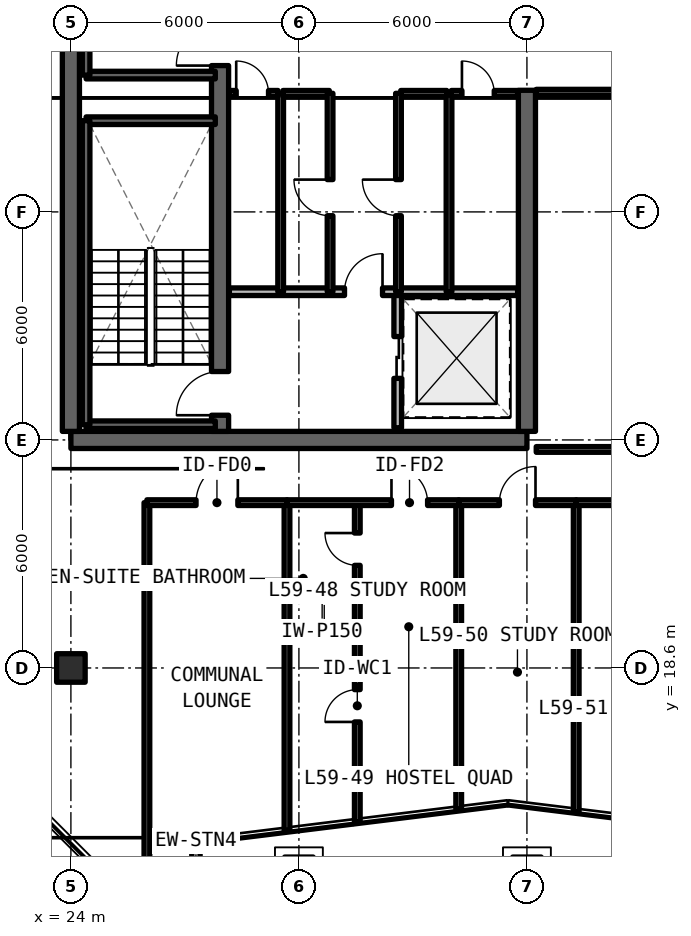
"""IFC4 building model, lengths in metres.
Left out: names, types, materials, properties, quantities, classifications, styles, units other than length and angle.
Written with IfcOpenShell. Run it as: python <this file> out.ifc"""

import sys

from ifc_helpers import new_model, si_unit, direction, frame, frame_2d, origin, origin_2d, place, context, subcontext, project, spatial, rectangle, extrude, element, fill, save


model = new_model("IFC4")
c1 = context("Model", 3, precision=1e-05, world=origin(), true_north=direction((0.0, 1.0)))
c2 = subcontext(c1, "Body", "Model", "MODEL_VIEW")
j1 = project(units=[si_unit("LENGTHUNIT", "METRE"), si_unit("PLANEANGLEUNIT", "RADIAN")], contexts=[c1])
p1 = place(None, origin())
s1 = spatial("IfcSite", under=j1, at=p1, CompositionType="ELEMENT")
p2 = place(p1, origin())
s2 = spatial("IfcBuilding", under=s1, at=p2, CompositionType="ELEMENT")
p3 = place(p2, frame((0.0, 0.0, 211.86)))
s3 = spatial("IfcBuildingStorey", under=s2, at=p3, CompositionType="ELEMENT", Elevation=211.86)
p4 = place(p3, frame((24.0, 24.6, 0.0), z_axis=(0.0, 0.0, 1.0), x_axis=(1.0, 0.0, 0.0)))
e1 = element("IfcWall", 1, at=p4, inside=s3, PredefinedType="SHEAR", context=c2, shape_type="SweptSolid", body=[
    extrude(rectangle(XDim=12.0, YDim=0.45, at=frame_2d((6.0, 0.0))), origin(), (0.0, 0.0, 1.0), 3.63),
])
p5 = place(p3, frame((24.0, 24.825, 0.0), z_axis=(0.0, 0.0, 1.0), x_axis=(0.0, 1.0, 0.0)))
e2 = element("IfcWall", 2, at=p5, inside=s3, PredefinedType="SHEAR", context=c2, shape_type="SweptSolid", body=[
    extrude(rectangle(XDim=17.55, YDim=0.45, at=frame_2d((8.775, 0.0))), origin(), (0.0, 0.0, 1.0), 3.63),
])
p6 = place(p3, frame((36.0, 24.825, 0.0), z_axis=(0.0, 0.0, 1.0), x_axis=(0.0, 1.0, 0.0)))
e3 = element("IfcWall", 3, at=p6, inside=s3, PredefinedType="SHEAR", context=c2, shape_type="SweptSolid", body=[
    extrude(rectangle(XDim=8.975, YDim=0.45, at=frame_2d((4.488, 0.0))), origin(), (0.0, 0.0, 1.0), 3.63),
])
p7 = place(p3, frame((27.925, 24.825, 0.0), z_axis=(0.0, 0.0, 1.0), x_axis=(0.0, 1.0, 0.0)))
e4 = element("IfcWall", 4, at=p7, inside=s3, PredefinedType="SHEAR", context=c2, shape_type="SweptSolid", body=[
    extrude(rectangle(XDim=17.55, YDim=0.45, at=frame_2d((8.775, 0.0))), origin(), (0.0, 0.0, 1.0), 3.63),
])
p8 = place(p7, frame((0.425, 0.0, 0.0)))
e5 = element("IfcOpeningElement", 5, at=p8, cuts=e4, PredefinedType="OPENING", context=c2, shape_type="SweptSolid", body=[
    extrude(rectangle(XDim=1.15, YDim=2.15, at=frame_2d((0.575, 1.075))), frame((0.0, 0.235, 0.0), z_axis=(0.0, -1.0, 0.0), x_axis=(1.0, 0.0, 0.0)), (0.0, 0.0, 1.0), 0.47),
])
p9 = place(p7, frame((9.625, 0.0, 0.0)))
e6 = element("IfcOpeningElement", 6, at=p9, cuts=e4, PredefinedType="OPENING", context=c2, shape_type="SweptSolid", body=[
    extrude(rectangle(XDim=1.15, YDim=2.15, at=frame_2d((0.575, 1.075))), frame((0.0, 0.235, 0.0), z_axis=(0.0, -1.0, 0.0), x_axis=(1.0, 0.0, 0.0)), (0.0, 0.0, 1.0), 0.47),
])
p10 = place(p3, frame((24.0, 18.6, 0.0), z_axis=(0.0, 0.0, 1.0), x_axis=(1.0, 0.0, 0.0)))
e7 = element("IfcColumn", 7, at=p10, inside=s3, PredefinedType="COLUMN", context=c2, shape_type="SweptSolid", body=[
    extrude(rectangle(XDim=0.75, YDim=0.75, at=origin_2d()), origin(), (0.0, 0.0, 1.0), 3.63),
])
p11 = place(p3, frame((27.29, 12.16, 0.0), z_axis=(0.0, 0.0, 1.0), x_axis=(0.0, 1.0, 0.0)))
e8 = element("IfcWall", 8, at=p11, inside=s3, PredefinedType="SOLIDWALL", context=c2, shape_type="SweptSolid", body=[
    extrude(rectangle(XDim=1.867, YDim=0.22, at=frame_2d((0.934, 0.0))), origin(), (0.0, 0.0, 1.0), 3.41),
])
p12 = place(p3, frame((21.71, 16.296, 0.0), z_axis=(0.0, 0.0, 1.0), x_axis=(0.707106781187, -0.707106781187, 0.0)))
e9 = element("IfcWall", 9, at=p12, inside=s3, PredefinedType="SOLIDWALL", context=c2, shape_type="SweptSolid", body=[
    extrude(rectangle(XDim=5.849, YDim=0.22, at=frame_2d((2.924, 0.0))), origin(), (0.0, 0.0, 1.0), 3.41),
])
p13 = place(p12, frame((1.224, 0.0, 0.78)))
e10 = element("IfcOpeningElement", 10, at=p13, cuts=e9, PredefinedType="OPENING", context=c2, shape_type="SweptSolid", body=[
    extrude(rectangle(XDim=3.4, YDim=1.66, at=frame_2d((1.7, 0.83))), frame((0.0, 0.12, 0.0), z_axis=(0.0, -1.0, 0.0), x_axis=(1.0, 0.0, 0.0)), (0.0, 0.0, 1.0), 0.24),
])
p14 = place(p3, frame((32.6, 24.92, 0.0), z_axis=(0.0, 0.0, 1.0), x_axis=(0.0, 1.0, 0.0)))
e11 = element("IfcWall", 11, at=p14, inside=s3, PredefinedType="SOLIDWALL", context=c2, shape_type="SweptSolid", body=[
    extrude(rectangle(XDim=3.58, YDim=0.2, at=frame_2d((1.79, 0.0))), origin(), (0.0, 0.0, 1.0), 2.63),
])
p15 = place(p14, frame((1.3, 0.0, 0.0)))
e12 = element("IfcOpeningElement", 12, at=p15, cuts=e11, PredefinedType="OPENING", context=c2, shape_type="SweptSolid", body=[
    extrude(rectangle(XDim=1.1, YDim=2.2, at=frame_2d((0.55, 1.1))), frame((0.0, 0.11, 0.0), z_axis=(0.0, -1.0, 0.0), x_axis=(1.0, 0.0, 0.0)), (0.0, 0.0, 1.0), 0.22),
])
p16 = place(p3, frame((28.17, 28.5, 0.0), z_axis=(0.0, 0.0, 1.0), x_axis=(1.0, 0.0, 0.0)))
e13 = element("IfcWall", 13, at=p16, inside=s3, PredefinedType="SOLIDWALL", context=c2, shape_type="SweptSolid", body=[
    extrude(rectangle(XDim=7.585, YDim=0.2, at=frame_2d((3.792, 0.0))), origin(), (0.0, 0.0, 1.0), 2.63),
])
p17 = place(p16, frame((3.03, 0.0, 0.0)))
e14 = element("IfcOpeningElement", 14, at=p17, cuts=e13, PredefinedType="OPENING", context=c2, shape_type="SweptSolid", body=[
    extrude(rectangle(XDim=1.0, YDim=2.15, at=frame_2d((0.5, 1.075))), frame((0.0, 0.11, 0.0), z_axis=(0.0, -1.0, 0.0), x_axis=(1.0, 0.0, 0.0)), (0.0, 0.0, 1.0), 0.22),
])
p18 = place(p3, frame((29.52, 28.5, 0.0), z_axis=(0.0, 0.0, 1.0), x_axis=(0.0, 1.0, 0.0)))
e15 = element("IfcWall", 15, at=p18, inside=s3, PredefinedType="SOLIDWALL", context=c2, shape_type="SweptSolid", body=[
    extrude(rectangle(XDim=5.22, YDim=0.15, at=frame_2d((2.61, 0.0))), origin(), (0.0, 0.0, 1.0), 2.63),
])
p19 = place(p3, frame((28.17, 33.72, 0.0), z_axis=(0.0, 0.0, 1.0), x_axis=(1.0, 0.0, 0.0)))
e16 = element("IfcWall", 16, at=p19, inside=s3, PredefinedType="SOLIDWALL", context=c2, shape_type="SweptSolid", body=[
    extrude(rectangle(XDim=1.28, YDim=0.15, at=frame_2d((0.64, 0.0))), origin(), (0.0, 0.0, 1.0), 2.63),
])
p20 = place(p19, frame((0.18, 0.0, 0.0)))
e17 = element("IfcOpeningElement", 17, at=p20, cuts=e16, PredefinedType="OPENING", context=c2, shape_type="SweptSolid", body=[
    extrude(rectangle(XDim=0.85, YDim=2.1, at=frame_2d((0.425, 1.05))), frame((0.0, 0.085, 0.0), z_axis=(0.0, -1.0, 0.0), x_axis=(1.0, 0.0, 0.0)), (0.0, 0.0, 1.0), 0.17),
])
p21 = place(p3, frame((29.58, 33.72, 0.0), z_axis=(0.0, 0.0, 1.0), x_axis=(1.0, 0.0, 0.0)))
e18 = element("IfcWall", 18, at=p21, inside=s3, PredefinedType="SOLIDWALL", context=c2, shape_type="SweptSolid", body=[
    extrude(rectangle(XDim=1.22, YDim=0.15, at=frame_2d((0.61, 0.0))), origin(), (0.0, 0.0, 1.0), 2.63),
])
p22 = place(p3, frame((30.82, 28.5, 0.0), z_axis=(0.0, 0.0, 1.0), x_axis=(0.0, 1.0, 0.0)))
e19 = element("IfcWall", 19, at=p22, inside=s3, PredefinedType="SOLIDWALL", context=c2, shape_type="SweptSolid", body=[
    extrude(rectangle(XDim=5.22, YDim=0.15, at=frame_2d((2.61, 0.0))), origin(), (0.0, 0.0, 1.0), 2.63),
])
p23 = place(p22, frame((2.0, 0.0, 0.0)))
e20 = element("IfcOpeningElement", 20, at=p23, cuts=e19, PredefinedType="OPENING", context=c2, shape_type="SweptSolid", body=[
    extrude(rectangle(XDim=0.95, YDim=2.15, at=frame_2d((0.475, 1.075))), frame((0.0, 0.085, 0.0), z_axis=(0.0, -1.0, 0.0), x_axis=(1.0, 0.0, 0.0)), (0.0, 0.0, 1.0), 0.17),
])
p24 = place(p3, frame((33.95, 28.5, 0.0), z_axis=(0.0, 0.0, 1.0), x_axis=(0.0, 1.0, 0.0)))
e21 = element("IfcWall", 21, at=p24, inside=s3, PredefinedType="SOLIDWALL", context=c2, shape_type="SweptSolid", body=[
    extrude(rectangle(XDim=5.22, YDim=0.15, at=frame_2d((2.61, 0.0))), origin(), (0.0, 0.0, 1.0), 2.63),
])
p25 = place(p3, frame((32.68, 33.72, 0.0), z_axis=(0.0, 0.0, 1.0), x_axis=(1.0, 0.0, 0.0)))
e22 = element("IfcWall", 22, at=p25, inside=s3, PredefinedType="SOLIDWALL", context=c2, shape_type="SweptSolid", body=[
    extrude(rectangle(XDim=1.21, YDim=0.15, at=frame_2d((0.605, 0.0))), origin(), (0.0, 0.0, 1.0), 2.63),
])
p26 = place(p3, frame((34.01, 33.72, 0.0), z_axis=(0.0, 0.0, 1.0), x_axis=(1.0, 0.0, 0.0)))
e23 = element("IfcWall", 23, at=p26, inside=s3, PredefinedType="SOLIDWALL", context=c2, shape_type="SweptSolid", body=[
    extrude(rectangle(XDim=1.745, YDim=0.15, at=frame_2d((0.873, 0.0))), origin(), (0.0, 0.0, 1.0), 2.63),
])
p27 = place(p26, frame((0.28, 0.0, 0.0)))
e24 = element("IfcOpeningElement", 24, at=p27, cuts=e23, PredefinedType="OPENING", context=c2, shape_type="SweptSolid", body=[
    extrude(rectangle(XDim=0.85, YDim=2.1, at=frame_2d((0.425, 1.05))), frame((0.0, 0.085, 0.0), z_axis=(0.0, -1.0, 0.0), x_axis=(1.0, 0.0, 0.0)), (0.0, 0.0, 1.0), 0.17),
])
p28 = place(p3, frame((32.62, 28.5, 0.0), z_axis=(0.0, 0.0, 1.0), x_axis=(0.0, 1.0, 0.0)))
e25 = element("IfcWall", 25, at=p28, inside=s3, PredefinedType="SOLIDWALL", context=c2, shape_type="SweptSolid", body=[
    extrude(rectangle(XDim=5.22, YDim=0.15, at=frame_2d((2.61, 0.0))), origin(), (0.0, 0.0, 1.0), 2.63),
])
p29 = place(p28, frame((2.0, 0.0, 0.0)))
e26 = element("IfcOpeningElement", 26, at=p29, cuts=e25, PredefinedType="OPENING", context=c2, shape_type="SweptSolid", body=[
    extrude(rectangle(XDim=0.95, YDim=2.15, at=frame_2d((0.475, 1.075))), frame((0.0, 0.085, 0.0), z_axis=(0.0, -1.0, 0.0), x_axis=(1.0, 0.0, 0.0)), (0.0, 0.0, 1.0), 0.17),
])
p30 = place(p3, frame((36.245, 24.35, 0.0), z_axis=(0.0, 0.0, 1.0), x_axis=(1.0, 0.0, 0.0)))
e27 = element("IfcWall", 27, at=p30, inside=s3, PredefinedType="SOLIDWALL", context=c2, shape_type="SweptSolid", body=[
    extrude(rectangle(XDim=7.905, YDim=0.15, at=frame_2d((3.952, 0.0))), origin(), (0.0, 0.0, 1.0), 2.63),
])
p31 = place(p3, frame((36.245, 33.75, 0.0), z_axis=(0.0, 0.0, 1.0), x_axis=(1.0, 0.0, 0.0)))
e28 = element("IfcWall", 28, at=p31, inside=s3, PredefinedType="SOLIDWALL", context=c2, shape_type="SweptSolid", body=[
    extrude(rectangle(XDim=7.905, YDim=0.15, at=frame_2d((3.952, 0.0))), origin(), (0.0, 0.0, 1.0), 2.63),
])
p32 = place(p31, frame((3.478, 0.0, 0.0)))
e29 = element("IfcOpeningElement", 29, at=p32, cuts=e28, PredefinedType="OPENING", context=c2, shape_type="SweptSolid", body=[
    extrude(rectangle(XDim=0.95, YDim=2.15, at=frame_2d((0.475, 1.075))), frame((0.0, 0.085, 0.0), z_axis=(0.0, -1.0, 0.0), x_axis=(1.0, 0.0, 0.0)), (0.0, 0.0, 1.0), 0.17),
])
p33 = place(p3, frame((26.0, 12.16, 0.0), z_axis=(0.0, 0.0, 1.0), x_axis=(0.0, 1.0, 0.0)))
e30 = element("IfcWall", 30, at=p33, inside=s3, PredefinedType="SOLIDWALL", context=c2, shape_type="SweptSolid", body=[
    extrude(rectangle(XDim=10.79, YDim=0.15, at=frame_2d((5.395, 0.0))), origin(), (0.0, 0.0, 1.0), 2.63),
])
p34 = place(p3, frame((29.686, 14.323, 0.0), z_axis=(0.0, 0.0, 1.0), x_axis=(0.0, 1.0, 0.0)))
e31 = element("IfcWall", 31, at=p34, inside=s3, PredefinedType="SOLIDWALL", context=c2, shape_type="SweptSolid", body=[
    extrude(rectangle(XDim=8.627, YDim=0.15, at=frame_2d((4.313, 0.0))), origin(), (0.0, 0.0, 1.0), 2.63),
])
p35 = place(p3, frame((26.0, 22.95, 0.0), z_axis=(0.0, 0.0, 1.0), x_axis=(1.0, 0.0, 0.0)))
e32 = element("IfcWall", 32, at=p35, inside=s3, PredefinedType="SOLIDWALL", context=c2, shape_type="SweptSolid", body=[
    extrude(rectangle(XDim=3.686, YDim=0.15, at=frame_2d((1.843, 0.0))), origin(), (0.0, 0.0, 1.0), 2.63),
])
p36 = place(p35, frame((1.293, 0.0, 0.0)))
e33 = element("IfcOpeningElement", 33, at=p36, cuts=e32, PredefinedType="OPENING", context=c2, shape_type="SweptSolid", body=[
    extrude(rectangle(XDim=1.1, YDim=2.15, at=frame_2d((0.55, 1.075))), frame((0.0, 0.085, 0.0), z_axis=(0.0, -1.0, 0.0), x_axis=(1.0, 0.0, 0.0)), (0.0, 0.0, 1.0), 0.17),
])
p37 = place(p3, frame((34.205, 14.881, 0.0), z_axis=(0.0, 0.0, 1.0), x_axis=(0.0, 1.0, 0.0)))
e34 = element("IfcWall", 34, at=p37, inside=s3, PredefinedType="SOLIDWALL", context=c2, shape_type="SweptSolid", body=[
    extrude(rectangle(XDim=8.069, YDim=0.15, at=frame_2d((4.035, 0.0))), origin(), (0.0, 0.0, 1.0), 2.63),
])
p38 = place(p3, frame((29.686, 20.5, 0.0), z_axis=(0.0, 0.0, 1.0), x_axis=(1.0, 0.0, 0.0)))
e35 = element("IfcWall", 35, at=p38, inside=s3, PredefinedType="PARTITIONING", context=c2, shape_type="SweptSolid", body=[
    extrude(rectangle(XDim=1.85, YDim=0.15, at=frame_2d((0.925, 0.0))), origin(), (0.0, 0.0, 1.0), 2.63),
])
p39 = place(p3, frame((31.536, 14.552, 0.0), z_axis=(0.0, 0.0, 1.0), x_axis=(0.0, 1.0, 0.0)))
e36 = element("IfcWall", 36, at=p39, inside=s3, PredefinedType="PARTITIONING", context=c2, shape_type="SweptSolid", body=[
    extrude(rectangle(XDim=8.398, YDim=0.15, at=frame_2d((4.199, 0.0))), origin(), (0.0, 0.0, 1.0), 2.63),
])
p40 = place(p39, frame((2.628, 0.0, 0.0)))
e37 = element("IfcOpeningElement", 37, at=p40, cuts=e36, PredefinedType="OPENING", context=c2, shape_type="SweptSolid", body=[
    extrude(rectangle(XDim=0.85, YDim=2.1, at=frame_2d((0.425, 1.05))), frame((0.0, 0.085, 0.0), z_axis=(0.0, -1.0, 0.0), x_axis=(1.0, 0.0, 0.0)), (0.0, 0.0, 1.0), 0.17),
])
p41 = place(p39, frame((6.749, 0.0, 0.0)))
e38 = element("IfcOpeningElement", 38, at=p41, cuts=e36, PredefinedType="OPENING", context=c2, shape_type="SweptSolid", body=[
    extrude(rectangle(XDim=0.85, YDim=2.1, at=frame_2d((0.425, 1.05))), frame((0.0, 0.085, 0.0), z_axis=(0.0, -1.0, 0.0), x_axis=(1.0, 0.0, 0.0)), (0.0, 0.0, 1.0), 0.17),
])
p42 = place(p3, frame((29.686, 22.95, 0.0), z_axis=(0.0, 0.0, 1.0), x_axis=(1.0, 0.0, 0.0)))
e39 = element("IfcWall", 39, at=p42, inside=s3, PredefinedType="SOLIDWALL", context=c2, shape_type="SweptSolid", body=[
    extrude(rectangle(XDim=4.519, YDim=0.15, at=frame_2d((2.259, 0.0))), origin(), (0.0, 0.0, 1.0), 2.63),
])
p43 = place(p42, frame((2.749, 0.0, 0.0)))
e40 = element("IfcOpeningElement", 40, at=p43, cuts=e39, PredefinedType="OPENING", context=c2, shape_type="SweptSolid", body=[
    extrude(rectangle(XDim=0.95, YDim=2.15, at=frame_2d((0.475, 1.075))), frame((0.0, 0.085, 0.0), z_axis=(0.0, -1.0, 0.0), x_axis=(1.0, 0.0, 0.0)), (0.0, 0.0, 1.0), 0.17),
])
p44 = place(p3, frame((37.297, 14.819, 0.0), z_axis=(0.0, 0.0, 1.0), x_axis=(0.0, 1.0, 0.0)))
e41 = element("IfcWall", 41, at=p44, inside=s3, PredefinedType="SOLIDWALL", context=c2, shape_type="SweptSolid", body=[
    extrude(rectangle(XDim=8.131, YDim=0.15, at=frame_2d((4.065, 0.0))), origin(), (0.0, 0.0, 1.0), 2.63),
])
p45 = place(p3, frame((34.205, 22.95, 0.0), z_axis=(0.0, 0.0, 1.0), x_axis=(1.0, 0.0, 0.0)))
e42 = element("IfcWall", 42, at=p45, inside=s3, PredefinedType="SOLIDWALL", context=c2, shape_type="SweptSolid", body=[
    extrude(rectangle(XDim=3.092, YDim=0.15, at=frame_2d((1.546, 0.0))), origin(), (0.0, 0.0, 1.0), 2.63),
])
p46 = place(p45, frame((1.071, 0.0, 0.0)))
e43 = element("IfcOpeningElement", 43, at=p46, cuts=e42, PredefinedType="OPENING", context=c2, shape_type="SweptSolid", body=[
    extrude(rectangle(XDim=0.95, YDim=2.15, at=frame_2d((0.475, 1.075))), frame((0.0, 0.085, 0.0), z_axis=(0.0, -1.0, 0.0), x_axis=(1.0, 0.0, 0.0)), (0.0, 0.0, 1.0), 0.17),
])
p47 = place(p3, frame((37.297, 22.95, 0.0), z_axis=(0.0, 0.0, 1.0), x_axis=(1.0, 0.0, 0.0)))
e44 = element("IfcWall", 44, at=p47, inside=s3, PredefinedType="SOLIDWALL", context=c2, shape_type="SweptSolid", body=[
    extrude(rectangle(XDim=3.21, YDim=0.15, at=frame_2d((1.605, 0.0))), origin(), (0.0, 0.0, 1.0), 2.63),
])
p48 = place(p47, frame((1.13, 0.0, 0.0)))
e45 = element("IfcOpeningElement", 45, at=p48, cuts=e44, PredefinedType="OPENING", context=c2, shape_type="SweptSolid", body=[
    extrude(rectangle(XDim=0.95, YDim=2.15, at=frame_2d((0.475, 1.075))), frame((0.0, 0.085, 0.0), z_axis=(0.0, -1.0, 0.0), x_axis=(1.0, 0.0, 0.0)), (0.0, 0.0, 1.0), 0.17),
])
for number, where, z_axis, x_axis in (
    (46, (24.4, 25.0, 0.0), (0.0, 0.0, 1.0), (1.0, 0.0, 0.0)),
    (47, (27.8, 33.0, 0.0), (0.0, 0.0, 1.0), (-1.0, 0.0, 0.0)),
):
    element("IfcWall", number, at=place(p3, frame(where, z_axis=z_axis, x_axis=x_axis)), inside=s3, PredefinedType="SOLIDWALL", context=c2, shape_type="SweptSolid", body=[
        extrude(rectangle(XDim=3.4, YDim=0.2, at=frame_2d((1.7, 0.0))), origin(), (0.0, 0.0, 1.0), 3.63),
    ])
p49 = place(p3, frame((24.4, 33.0, 0.0), z_axis=(0.0, 0.0, 1.0), x_axis=(0.0, -1.0, 0.0)))
e48 = element("IfcWall", 48, at=p49, inside=s3, PredefinedType="SOLIDWALL", context=c2, shape_type="SweptSolid", body=[
    extrude(rectangle(XDim=8.0, YDim=0.2, at=frame_2d((4.0, 0.0))), origin(), (0.0, 0.0, 1.0), 3.63),
])
p50 = place(p3, frame((24.4, 34.2, 0.0), z_axis=(0.0, 0.0, 1.0), x_axis=(1.0, 0.0, 0.0)))
e49 = element("IfcWall", 49, at=p50, inside=s3, PredefinedType="SOLIDWALL", context=c2, shape_type="SweptSolid", body=[
    extrude(rectangle(XDim=3.4, YDim=0.2, at=frame_2d((1.7, 0.0))), origin(), (0.0, 0.0, 1.0), 3.63),
])
p51 = place(p3, frame((24.4, 42.2, 0.0), z_axis=(0.0, 0.0, 1.0), x_axis=(0.0, -1.0, 0.0)))
e50 = element("IfcWall", 50, at=p51, inside=s3, PredefinedType="SOLIDWALL", context=c2, shape_type="SweptSolid", body=[
    extrude(rectangle(XDim=8.0, YDim=0.2, at=frame_2d((4.0, 0.0))), origin(), (0.0, 0.0, 1.0), 3.63),
])
p52 = place(p13, origin())
e51 = element("IfcWindow", 51, at=p52, inside=s3, PartitioningType="SINGLE_PANEL", PredefinedType="WINDOW", context=c2, shape_type="SweptSolid", body=[
    extrude(rectangle(XDim=3.4, YDim=1.66, at=frame_2d((1.7, 0.83))), frame((0.0, 0.03, 0.0), z_axis=(0.0, -1.0, 0.0), x_axis=(1.0, 0.0, 0.0)), (0.0, 0.0, 1.0), 0.06),
])
fill(e10, e51)
p53 = place(p15, origin())
e52 = element("IfcDoor", 52, at=p53, inside=s3, OperationType="SLIDING_TO_LEFT", PredefinedType="DOOR", context=c2, shape_type="SweptSolid", body=[
    extrude(rectangle(XDim=1.1, YDim=2.2, at=frame_2d((0.55, 1.1))), frame((0.0, 0.025, 0.0), z_axis=(0.0, -1.0, 0.0), x_axis=(1.0, 0.0, 0.0)), (0.0, 0.0, 1.0), 0.05),
])
fill(e12, e52)
p54 = place(p17, origin())
e53 = element("IfcDoor", 53, at=p54, inside=s3, OperationType="SINGLE_SWING_RIGHT", PredefinedType="DOOR", context=c2, shape_type="SweptSolid", body=[
    extrude(rectangle(XDim=1.0, YDim=2.15, at=frame_2d((0.5, 1.075))), frame((0.0, 0.025, 0.0), z_axis=(0.0, -1.0, 0.0), x_axis=(1.0, 0.0, 0.0)), (0.0, 0.0, 1.0), 0.05),
])
fill(e14, e53)
p55 = place(p20, origin())
e54 = element("IfcDoor", 54, at=p55, inside=s3, OperationType="SINGLE_SWING_LEFT", PredefinedType="DOOR", context=c2, shape_type="SweptSolid", body=[
    extrude(rectangle(XDim=0.85, YDim=2.1, at=frame_2d((0.425, 1.05))), frame((0.0, 0.025, 0.0), z_axis=(0.0, -1.0, 0.0), x_axis=(1.0, 0.0, 0.0)), (0.0, 0.0, 1.0), 0.05),
])
fill(e17, e54)
p56 = place(p23, origin())
e55 = element("IfcDoor", 55, at=p56, inside=s3, OperationType="SINGLE_SWING_RIGHT", PredefinedType="DOOR", context=c2, shape_type="SweptSolid", body=[
    extrude(rectangle(XDim=0.95, YDim=2.15, at=frame_2d((0.475, 1.075))), frame((0.0, 0.025, 0.0), z_axis=(0.0, -1.0, 0.0), x_axis=(1.0, 0.0, 0.0)), (0.0, 0.0, 1.0), 0.05),
])
fill(e20, e55)
p57 = place(p27, origin())
e56 = element("IfcDoor", 56, at=p57, inside=s3, OperationType="SINGLE_SWING_LEFT", PredefinedType="DOOR", context=c2, shape_type="SweptSolid", body=[
    extrude(rectangle(XDim=0.85, YDim=2.1, at=frame_2d((0.425, 1.05))), frame((0.0, 0.025, 0.0), z_axis=(0.0, -1.0, 0.0), x_axis=(1.0, 0.0, 0.0)), (0.0, 0.0, 1.0), 0.05),
])
fill(e24, e56)
p58 = place(p29, origin())
e57 = element("IfcDoor", 57, at=p58, inside=s3, OperationType="SINGLE_SWING_RIGHT", PredefinedType="DOOR", context=c2, shape_type="SweptSolid", body=[
    extrude(rectangle(XDim=0.95, YDim=2.15, at=frame_2d((0.475, 1.075))), frame((0.0, 0.025, 0.0), z_axis=(0.0, -1.0, 0.0), x_axis=(1.0, 0.0, 0.0)), (0.0, 0.0, 1.0), 0.05),
])
fill(e26, e57)
p59 = place(p36, origin())
e58 = element("IfcDoor", 58, at=p59, inside=s3, OperationType="SINGLE_SWING_RIGHT", PredefinedType="DOOR", context=c2, shape_type="SweptSolid", body=[
    extrude(rectangle(XDim=1.1, YDim=2.15, at=frame_2d((0.55, 1.075))), frame((0.0, 0.025, 0.0), z_axis=(0.0, -1.0, 0.0), x_axis=(1.0, 0.0, 0.0)), (0.0, 0.0, 1.0), 0.05),
])
fill(e33, e58)
p60 = place(p40, origin())
e59 = element("IfcDoor", 59, at=p60, inside=s3, OperationType="SINGLE_SWING_LEFT", PredefinedType="DOOR", context=c2, shape_type="SweptSolid", body=[
    extrude(rectangle(XDim=0.85, YDim=2.1, at=frame_2d((0.425, 1.05))), frame((0.0, 0.025, 0.0), z_axis=(0.0, -1.0, 0.0), x_axis=(1.0, 0.0, 0.0)), (0.0, 0.0, 1.0), 0.05),
])
fill(e37, e59)
p61 = place(p41, origin())
e60 = element("IfcDoor", 60, at=p61, inside=s3, OperationType="SINGLE_SWING_RIGHT", PredefinedType="DOOR", context=c2, shape_type="SweptSolid", body=[
    extrude(rectangle(XDim=0.85, YDim=2.1, at=frame_2d((0.425, 1.05))), frame((0.0, 0.025, 0.0), z_axis=(0.0, -1.0, 0.0), x_axis=(1.0, 0.0, 0.0)), (0.0, 0.0, 1.0), 0.05),
])
fill(e38, e60)
p62 = place(p43, origin())
e61 = element("IfcDoor", 61, at=p62, inside=s3, OperationType="SINGLE_SWING_LEFT", PredefinedType="DOOR", context=c2, shape_type="SweptSolid", body=[
    extrude(rectangle(XDim=0.95, YDim=2.15, at=frame_2d((0.475, 1.075))), frame((0.0, 0.025, 0.0), z_axis=(0.0, -1.0, 0.0), x_axis=(1.0, 0.0, 0.0)), (0.0, 0.0, 1.0), 0.05),
])
fill(e40, e61)
p63 = place(p46, origin())
e62 = element("IfcDoor", 62, at=p63, inside=s3, OperationType="SINGLE_SWING_RIGHT", PredefinedType="DOOR", context=c2, shape_type="SweptSolid", body=[
    extrude(rectangle(XDim=0.95, YDim=2.15, at=frame_2d((0.475, 1.075))), frame((0.0, 0.025, 0.0), z_axis=(0.0, -1.0, 0.0), x_axis=(1.0, 0.0, 0.0)), (0.0, 0.0, 1.0), 0.05),
])
fill(e43, e62)
p64 = place(p8, origin())
e63 = element("IfcDoor", 63, at=p64, inside=s3, OperationType="SINGLE_SWING_RIGHT", PredefinedType="DOOR", context=c2, shape_type="SweptSolid", body=[
    extrude(rectangle(XDim=1.15, YDim=2.15, at=frame_2d((0.575, 1.075))), frame((0.0, 0.025, 0.0), z_axis=(0.0, -1.0, 0.0), x_axis=(1.0, 0.0, 0.0)), (0.0, 0.0, 1.0), 0.05),
])
fill(e5, e63)
p65 = place(p9, origin())
e64 = element("IfcDoor", 64, at=p65, inside=s3, OperationType="SINGLE_SWING_LEFT", PredefinedType="DOOR", context=c2, shape_type="SweptSolid", body=[
    extrude(rectangle(XDim=1.15, YDim=2.15, at=frame_2d((0.575, 1.075))), frame((0.0, 0.025, 0.0), z_axis=(0.0, -1.0, 0.0), x_axis=(1.0, 0.0, 0.0)), (0.0, 0.0, 1.0), 0.05),
])
fill(e6, e64)
save(model, sys.argv[1])
